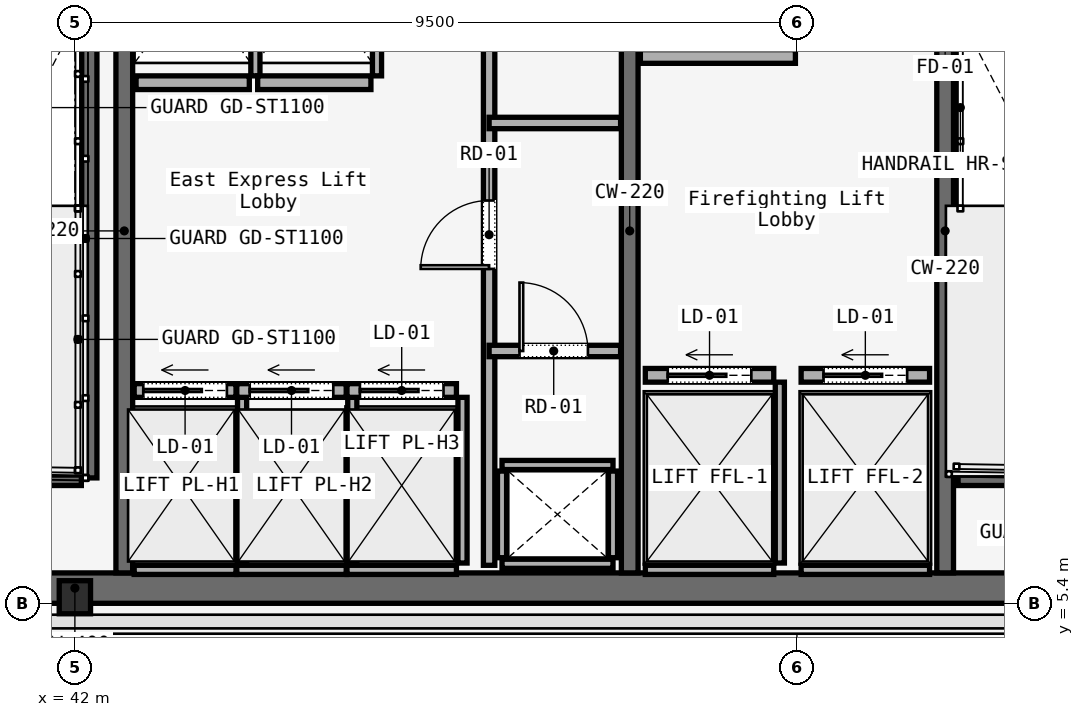
"""IFC4 building model, lengths in metres.
Left out: names, types, materials, properties, quantities, classifications, styles, units other than length and angle.
Written with IfcOpenShell. Run it as: python <this file> out.ifc"""

import sys

from ifc_helpers import new_model, si_unit, direction, frame, frame_2d, origin, origin_2d, place, context, subcontext, project, spatial, rectangle, i_section, extrude, element, fill, save


model = new_model("IFC4")
c1 = context("Model", 3, precision=1e-05, world=origin(), true_north=direction((0.0, 1.0)))
c2 = subcontext(c1, "Body", "Model", "MODEL_VIEW")
j1 = project(units=[si_unit("LENGTHUNIT", "METRE"), si_unit("PLANEANGLEUNIT", "RADIAN")], contexts=[c1])
p1 = place(None, origin())
s1 = spatial("IfcSite", under=j1, at=p1, CompositionType="ELEMENT")
p2 = place(p1, origin())
s2 = spatial("IfcBuilding", under=s1, at=p2, CompositionType="ELEMENT")
p3 = place(p2, frame((0.0, 0.0, 229.4)))
s3 = spatial("IfcBuildingStorey", under=s2, at=p3, CompositionType="ELEMENT", Elevation=229.4)
p4 = place(p3, frame((26.45, 5.6, 0.0), z_axis=(0.0, 0.0, 1.0), x_axis=(1.0, 0.0, 0.0)))
e1 = element("IfcWall", 1, at=p4, inside=s3, PredefinedType="SOLIDWALL", context=c2, shape_type="SweptSolid", body=[
    extrude(rectangle(XDim=31.1, YDim=0.4, at=frame_2d((15.55, 0.0))), origin(), (0.0, 0.0, 1.0), 3.58),
])
for number, where, z_axis, x_axis in (
    (2, (42.65, 5.8, 0.0), (0.0, 0.0, 1.0), (0.0, 1.0, 0.0)),
    (3, (49.3, 5.8, 0.0), (0.0, 0.0, 1.0), (0.0, 1.0, 0.0)),
):
    element("IfcWall", number, at=place(p3, frame(where, z_axis=z_axis, x_axis=x_axis)), inside=s3, PredefinedType="SOLIDWALL", context=c2, shape_type="SweptSolid", body=[
        extrude(rectangle(XDim=9.0, YDim=0.22, at=frame_2d((4.5, 0.0))), origin(), (0.0, 0.0, 1.0), 3.58),
    ])
p5 = place(p3, frame((53.45, 5.8, 0.0), z_axis=(0.0, 0.0, 1.0), x_axis=(0.0, 1.0, 0.0)))
e4 = element("IfcWall", 4, at=p5, inside=s3, PredefinedType="SOLIDWALL", context=c2, shape_type="SweptSolid", body=[
    extrude(rectangle(XDim=9.0, YDim=0.22, at=frame_2d((4.5, 0.0))), origin(), (0.0, 0.0, 1.0), 3.58),
])
p6 = place(p5, frame((7.5, 0.0, 0.0)))
e5 = element("IfcOpeningElement", 5, at=p6, cuts=e4, PredefinedType="OPENING", context=c2, shape_type="SweptSolid", body=[
    extrude(rectangle(XDim=1.1, YDim=2.2, at=frame_2d((0.55, 1.1))), frame((0.0, 0.11, 0.0), z_axis=(0.0, -1.0, 0.0), x_axis=(1.0, 0.0, 0.0)), (0.0, 0.0, 1.0), 0.22),
])
p7 = place(p3, frame((42.0, 5.48, 0.0), z_axis=(0.0, 0.0, 1.0), x_axis=(1.0, 0.0, 0.0)))
e6 = element("IfcColumn", 6, at=p7, inside=s3, PredefinedType="COLUMN", context=c2, shape_type="SweptSolid", body=[
    extrude(i_section(OverallWidth=0.412, OverallDepth=0.435, WebThickness=0.036, FlangeThickness=0.044, FilletRadius=0.015, at=origin_2d()), origin(), (0.0, 0.0, 1.0), 3.58),
])
p8 = place(p3, frame((42.19, 14.7, 0.0), z_axis=(0.0, 0.0, 1.0), x_axis=(0.0, -1.0, 0.0)))
e7 = element("IfcWall", 7, at=p8, inside=s3, PredefinedType="SOLIDWALL", context=c2, shape_type="SweptSolid", body=[
    extrude(rectangle(XDim=7.65, YDim=0.2, at=frame_2d((3.825, 0.0))), origin(), (0.0, 0.0, 1.0), 3.8),
])
for number, where, z_axis, x_axis in (
    (8, (38.97, 7.05, 0.0), (0.0, 0.0, 1.0), (1.0, 0.0, 0.0)),
    (9, (53.62, 7.05, 0.0), (0.0, 0.0, 1.0), (1.0, 0.0, 0.0)),
):
    element("IfcWall", number, at=place(p3, frame(where, z_axis=z_axis, x_axis=x_axis)), inside=s3, PredefinedType="SOLIDWALL", context=c2, shape_type="SweptSolid", body=[
        extrude(rectangle(XDim=3.115, YDim=0.2, at=frame_2d((1.558, 0.0))), origin(), (0.0, 0.0, 1.0), 3.8),
    ])
for number, where, z_axis, x_axis in (
    (10, (47.62, 5.92, 0.0), (0.0, 0.0, 1.0), (1.0, 0.0, 0.0)),
    (11, (47.62, 7.22, 0.0), (0.0, 0.0, 1.0), (1.0, 0.0, 0.0)),
):
    element("IfcWall", number, at=place(p3, frame(where, z_axis=z_axis, x_axis=x_axis)), inside=s3, PredefinedType="SOLIDWALL", context=c2, shape_type="SweptSolid", body=[
        extrude(rectangle(XDim=1.46, YDim=0.12, at=frame_2d((0.73, 0.0))), origin(), (0.0, 0.0, 1.0), 3.01),
    ])
for number, where, z_axis, x_axis in (
    (12, (47.62, 6.0, 0.0), (0.0, 0.0, 1.0), (0.0, 1.0, 0.0)),
    (13, (49.08, 6.0, 0.0), (0.0, 0.0, 1.0), (0.0, 1.0, 0.0)),
):
    element("IfcWall", number, at=place(p3, frame(where, z_axis=z_axis, x_axis=x_axis)), inside=s3, PredefinedType="SOLIDWALL", context=c2, shape_type="SweptSolid", body=[
        extrude(rectangle(XDim=1.14, YDim=0.12, at=frame_2d((0.57, 0.0))), origin(), (0.0, 0.0, 1.0), 3.01),
    ])
p9 = place(p3, frame((47.45, 5.9, 0.0), z_axis=(0.0, 0.0, 1.0), x_axis=(0.0, 1.0, 0.0)))
e14 = element("IfcWall", 14, at=p9, inside=s3, PredefinedType="PARTITIONING", context=c2, shape_type="SweptSolid", body=[
    extrude(rectangle(XDim=8.85, YDim=0.15, at=frame_2d((4.425, 0.0))), origin(), (0.0, 0.0, 1.0), 3.01),
])
p10 = place(p9, frame((3.9, 0.0, 0.0)))
e15 = element("IfcOpeningElement", 15, at=p10, cuts=e14, PredefinedType="OPENING", context=c2, shape_type="SweptSolid", body=[
    extrude(rectangle(XDim=0.9, YDim=2.1, at=frame_2d((0.45, 1.05))), frame((0.0, 0.075, 0.0), z_axis=(0.0, -1.0, 0.0), x_axis=(1.0, 0.0, 0.0)), (0.0, 0.0, 1.0), 0.15),
])
p11 = place(p3, frame((47.45, 8.72, 0.0), z_axis=(0.0, 0.0, 1.0), x_axis=(1.0, 0.0, 0.0)))
e16 = element("IfcWall", 16, at=p11, inside=s3, PredefinedType="PARTITIONING", context=c2, shape_type="SweptSolid", body=[
    extrude(rectangle(XDim=1.73, YDim=0.15, at=frame_2d((0.865, 0.0))), origin(), (0.0, 0.0, 1.0), 3.01),
])
p12 = place(p11, frame((0.4, 0.0, 0.0)))
e17 = element("IfcOpeningElement", 17, at=p12, cuts=e16, PredefinedType="OPENING", context=c2, shape_type="SweptSolid", body=[
    extrude(rectangle(XDim=0.9, YDim=2.1, at=frame_2d((0.45, 1.05))), frame((0.0, 0.075, 0.0), z_axis=(0.0, -1.0, 0.0), x_axis=(1.0, 0.0, 0.0)), (0.0, 0.0, 1.0), 0.15),
])
p13 = place(p3, frame((47.45, 11.72, 0.0), z_axis=(0.0, 0.0, 1.0), x_axis=(1.0, 0.0, 0.0)))
e18 = element("IfcWall", 18, at=p13, inside=s3, PredefinedType="PARTITIONING", context=c2, shape_type="SweptSolid", body=[
    extrude(rectangle(XDim=1.73, YDim=0.15, at=frame_2d((0.865, 0.0))), origin(), (0.0, 0.0, 1.0), 3.01),
])
p14 = place(p3, frame((42.78, 8.2, 0.0), z_axis=(0.0, 0.0, 1.0), x_axis=(1.0, 0.0, 0.0)))
e19 = element("IfcWall", 19, at=p14, inside=s3, PredefinedType="SOLIDWALL", context=c2, shape_type="SweptSolid", body=[
    extrude(rectangle(XDim=1.34, YDim=0.18, at=frame_2d((0.67, 0.0))), origin(), (0.0, 0.0, 1.0), 3.01),
])
p15 = place(p14, frame((0.12, 0.0, 0.0)))
e20 = element("IfcOpeningElement", 20, at=p15, cuts=e19, PredefinedType="OPENING", context=c2, shape_type="SweptSolid", body=[
    extrude(rectangle(XDim=1.1, YDim=2.2, at=frame_2d((0.55, 1.1))), frame((0.0, 0.09, 0.0), z_axis=(0.0, -1.0, 0.0), x_axis=(1.0, 0.0, 0.0)), (0.0, 0.0, 1.0), 0.18),
])
p16 = place(p3, frame((42.78, 5.84, 0.0), z_axis=(0.0, 0.0, 1.0), x_axis=(1.0, 0.0, 0.0)))
e21 = element("IfcWall", 21, at=p16, inside=s3, PredefinedType="SOLIDWALL", context=c2, shape_type="SweptSolid", body=[
    extrude(rectangle(XDim=1.34, YDim=0.12, at=frame_2d((0.67, 0.0))), origin(), (0.0, 0.0, 1.0), 3.01),
])
p17 = place(p3, frame((44.2, 5.93, 0.0), z_axis=(0.0, 0.0, 1.0), x_axis=(0.0, 1.0, 0.0)))
e22 = element("IfcWall", 22, at=p17, inside=s3, PredefinedType="SOLIDWALL", context=c2, shape_type="SweptSolid", body=[
    extrude(rectangle(XDim=2.18, YDim=0.12, at=frame_2d((1.09, 0.0))), origin(), (0.0, 0.0, 1.0), 3.01),
])
p18 = place(p3, frame((44.13, 8.2, 0.0), z_axis=(0.0, 0.0, 1.0), x_axis=(1.0, 0.0, 0.0)))
e23 = element("IfcWall", 23, at=p18, inside=s3, PredefinedType="SOLIDWALL", context=c2, shape_type="SweptSolid", body=[
    extrude(rectangle(XDim=1.44, YDim=0.18, at=frame_2d((0.72, 0.0))), origin(), (0.0, 0.0, 1.0), 3.01),
])
p19 = place(p18, frame((0.17, 0.0, 0.0)))
e24 = element("IfcOpeningElement", 24, at=p19, cuts=e23, PredefinedType="OPENING", context=c2, shape_type="SweptSolid", body=[
    extrude(rectangle(XDim=1.1, YDim=2.2, at=frame_2d((0.55, 1.1))), frame((0.0, 0.09, 0.0), z_axis=(0.0, -1.0, 0.0), x_axis=(1.0, 0.0, 0.0)), (0.0, 0.0, 1.0), 0.18),
])
p20 = place(p3, frame((44.13, 5.84, 0.0), z_axis=(0.0, 0.0, 1.0), x_axis=(1.0, 0.0, 0.0)))
e25 = element("IfcWall", 25, at=p20, inside=s3, PredefinedType="SOLIDWALL", context=c2, shape_type="SweptSolid", body=[
    extrude(rectangle(XDim=1.44, YDim=0.12, at=frame_2d((0.72, 0.0))), origin(), (0.0, 0.0, 1.0), 3.01),
])
p21 = place(p3, frame((45.65, 5.93, 0.0), z_axis=(0.0, 0.0, 1.0), x_axis=(0.0, 1.0, 0.0)))
e26 = element("IfcWall", 26, at=p21, inside=s3, PredefinedType="SOLIDWALL", context=c2, shape_type="SweptSolid", body=[
    extrude(rectangle(XDim=2.18, YDim=0.12, at=frame_2d((1.09, 0.0))), origin(), (0.0, 0.0, 1.0), 3.01),
])
p22 = place(p3, frame((45.58, 8.2, 0.0), z_axis=(0.0, 0.0, 1.0), x_axis=(1.0, 0.0, 0.0)))
e27 = element("IfcWall", 27, at=p22, inside=s3, PredefinedType="SOLIDWALL", context=c2, shape_type="SweptSolid", body=[
    extrude(rectangle(XDim=1.44, YDim=0.18, at=frame_2d((0.72, 0.0))), origin(), (0.0, 0.0, 1.0), 3.01),
])
p23 = place(p22, frame((0.17, 0.0, 0.0)))
e28 = element("IfcOpeningElement", 28, at=p23, cuts=e27, PredefinedType="OPENING", context=c2, shape_type="SweptSolid", body=[
    extrude(rectangle(XDim=1.1, YDim=2.2, at=frame_2d((0.55, 1.1))), frame((0.0, 0.09, 0.0), z_axis=(0.0, -1.0, 0.0), x_axis=(1.0, 0.0, 0.0)), (0.0, 0.0, 1.0), 0.18),
])
p24 = place(p3, frame((45.58, 5.84, 0.0), z_axis=(0.0, 0.0, 1.0), x_axis=(1.0, 0.0, 0.0)))
e29 = element("IfcWall", 29, at=p24, inside=s3, PredefinedType="SOLIDWALL", context=c2, shape_type="SweptSolid", body=[
    extrude(rectangle(XDim=1.44, YDim=0.12, at=frame_2d((0.72, 0.0))), origin(), (0.0, 0.0, 1.0), 3.01),
])
p25 = place(p3, frame((47.1, 5.93, 0.0), z_axis=(0.0, 0.0, 1.0), x_axis=(0.0, 1.0, 0.0)))
e30 = element("IfcWall", 30, at=p25, inside=s3, PredefinedType="SOLIDWALL", context=c2, shape_type="SweptSolid", body=[
    extrude(rectangle(XDim=2.18, YDim=0.12, at=frame_2d((1.09, 0.0))), origin(), (0.0, 0.0, 1.0), 3.01),
])
p26 = place(p3, frame((42.805, 12.25, 0.0), z_axis=(0.0, 0.0, 1.0), x_axis=(1.0, 0.0, 0.0)))
e31 = element("IfcWall", 31, at=p26, inside=s3, PredefinedType="SOLIDWALL", context=c2, shape_type="SweptSolid", body=[
    extrude(rectangle(XDim=1.49, YDim=0.18, at=frame_2d((0.745, 0.0))), origin(), (0.0, 0.0, 1.0), 3.01),
])
p27 = place(p3, frame((44.375, 12.34, 0.0), z_axis=(0.0, 0.0, 1.0), x_axis=(0.0, 1.0, 0.0)))
e32 = element("IfcWall", 32, at=p27, inside=s3, PredefinedType="SOLIDWALL", context=c2, shape_type="SweptSolid", body=[
    extrude(rectangle(XDim=2.23, YDim=0.12, at=frame_2d((1.115, 0.0))), origin(), (0.0, 0.0, 1.0), 3.01),
])
p28 = place(p3, frame((44.405, 12.25, 0.0), z_axis=(0.0, 0.0, 1.0), x_axis=(1.0, 0.0, 0.0)))
e33 = element("IfcWall", 33, at=p28, inside=s3, PredefinedType="SOLIDWALL", context=c2, shape_type="SweptSolid", body=[
    extrude(rectangle(XDim=1.49, YDim=0.18, at=frame_2d((0.745, 0.0))), origin(), (0.0, 0.0, 1.0), 3.01),
])
p29 = place(p3, frame((45.975, 12.34, 0.0), z_axis=(0.0, 0.0, 1.0), x_axis=(0.0, 1.0, 0.0)))
e34 = element("IfcWall", 34, at=p29, inside=s3, PredefinedType="SOLIDWALL", context=c2, shape_type="SweptSolid", body=[
    extrude(rectangle(XDim=2.23, YDim=0.12, at=frame_2d((1.115, 0.0))), origin(), (0.0, 0.0, 1.0), 3.01),
])
p30 = place(p3, frame((49.505, 8.4, 0.0), z_axis=(0.0, 0.0, 1.0), x_axis=(1.0, 0.0, 0.0)))
e35 = element("IfcWall", 35, at=p30, inside=s3, PredefinedType="SOLIDWALL", context=c2, shape_type="SweptSolid", body=[
    extrude(rectangle(XDim=1.69, YDim=0.18, at=frame_2d((0.845, 0.0))), origin(), (0.0, 0.0, 1.0), 3.01),
])
p31 = place(p30, frame((0.295, 0.0, 0.0)))
e36 = element("IfcOpeningElement", 36, at=p31, cuts=e35, PredefinedType="OPENING", context=c2, shape_type="SweptSolid", body=[
    extrude(rectangle(XDim=1.1, YDim=2.2, at=frame_2d((0.55, 1.1))), frame((0.0, 0.09, 0.0), z_axis=(0.0, -1.0, 0.0), x_axis=(1.0, 0.0, 0.0)), (0.0, 0.0, 1.0), 0.18),
])
p32 = place(p3, frame((49.505, 5.84, 0.0), z_axis=(0.0, 0.0, 1.0), x_axis=(1.0, 0.0, 0.0)))
e37 = element("IfcWall", 37, at=p32, inside=s3, PredefinedType="SOLIDWALL", context=c2, shape_type="SweptSolid", body=[
    extrude(rectangle(XDim=1.69, YDim=0.12, at=frame_2d((0.845, 0.0))), origin(), (0.0, 0.0, 1.0), 3.01),
])
p33 = place(p3, frame((51.275, 5.93, 0.0), z_axis=(0.0, 0.0, 1.0), x_axis=(0.0, 1.0, 0.0)))
e38 = element("IfcWall", 38, at=p33, inside=s3, PredefinedType="SOLIDWALL", context=c2, shape_type="SweptSolid", body=[
    extrude(rectangle(XDim=2.38, YDim=0.12, at=frame_2d((1.19, 0.0))), origin(), (0.0, 0.0, 1.0), 3.01),
])
p34 = place(p3, frame((51.555, 8.4, 0.0), z_axis=(0.0, 0.0, 1.0), x_axis=(1.0, 0.0, 0.0)))
e39 = element("IfcWall", 39, at=p34, inside=s3, PredefinedType="SOLIDWALL", context=c2, shape_type="SweptSolid", body=[
    extrude(rectangle(XDim=1.69, YDim=0.18, at=frame_2d((0.845, 0.0))), origin(), (0.0, 0.0, 1.0), 3.01),
])
p35 = place(p34, frame((0.295, 0.0, 0.0)))
e40 = element("IfcOpeningElement", 40, at=p35, cuts=e39, PredefinedType="OPENING", context=c2, shape_type="SweptSolid", body=[
    extrude(rectangle(XDim=1.1, YDim=2.2, at=frame_2d((0.55, 1.1))), frame((0.0, 0.09, 0.0), z_axis=(0.0, -1.0, 0.0), x_axis=(1.0, 0.0, 0.0)), (0.0, 0.0, 1.0), 0.18),
])
p36 = place(p3, frame((51.555, 5.84, 0.0), z_axis=(0.0, 0.0, 1.0), x_axis=(1.0, 0.0, 0.0)))
e41 = element("IfcWall", 41, at=p36, inside=s3, PredefinedType="SOLIDWALL", context=c2, shape_type="SweptSolid", body=[
    extrude(rectangle(XDim=1.69, YDim=0.12, at=frame_2d((0.845, 0.0))), origin(), (0.0, 0.0, 1.0), 3.01),
])
p37 = place(p3, frame((49.44, 12.595, 0.0), z_axis=(0.0, 0.0, 1.0), x_axis=(1.0, 0.0, 0.0)))
e42 = element("IfcWall", 42, at=p37, inside=s3, PredefinedType="SOLIDWALL", context=c2, shape_type="SweptSolid", body=[
    extrude(rectangle(XDim=2.04, YDim=0.18, at=frame_2d((1.02, 0.0))), origin(), (0.0, 0.0, 1.0), 3.01),
])
p38 = place(p10, origin())
e43 = element("IfcDoor", 43, at=p38, inside=s3, OperationType="SINGLE_SWING_LEFT", PredefinedType="DOOR", context=c2, shape_type="SweptSolid", body=[
    extrude(rectangle(XDim=0.9, YDim=2.1, at=frame_2d((0.45, 1.05))), frame((0.0, 0.025, 0.0), z_axis=(0.0, -1.0, 0.0), x_axis=(1.0, 0.0, 0.0)), (0.0, 0.0, 1.0), 0.05),
])
fill(e15, e43)
p39 = place(p12, origin())
e44 = element("IfcDoor", 44, at=p39, inside=s3, OperationType="SINGLE_SWING_RIGHT", PredefinedType="DOOR", context=c2, shape_type="SweptSolid", body=[
    extrude(rectangle(XDim=0.9, YDim=2.1, at=frame_2d((0.45, 1.05))), frame((0.0, 0.025, 0.0), z_axis=(0.0, -1.0, 0.0), x_axis=(1.0, 0.0, 0.0)), (0.0, 0.0, 1.0), 0.05),
])
fill(e17, e44)
p40 = place(p15, origin())
e45 = element("IfcDoor", 45, at=p40, inside=s3, OperationType="SLIDING_TO_LEFT", PredefinedType="DOOR", context=c2, shape_type="SweptSolid", body=[
    extrude(rectangle(XDim=1.1, YDim=2.2, at=frame_2d((0.55, 1.1))), frame((0.0, 0.025, 0.0), z_axis=(0.0, -1.0, 0.0), x_axis=(1.0, 0.0, 0.0)), (0.0, 0.0, 1.0), 0.05),
])
fill(e20, e45)
p41 = place(p19, origin())
e46 = element("IfcDoor", 46, at=p41, inside=s3, OperationType="SLIDING_TO_LEFT", PredefinedType="DOOR", context=c2, shape_type="SweptSolid", body=[
    extrude(rectangle(XDim=1.1, YDim=2.2, at=frame_2d((0.55, 1.1))), frame((0.0, 0.025, 0.0), z_axis=(0.0, -1.0, 0.0), x_axis=(1.0, 0.0, 0.0)), (0.0, 0.0, 1.0), 0.05),
])
fill(e24, e46)
p42 = place(p23, origin())
e47 = element("IfcDoor", 47, at=p42, inside=s3, OperationType="SLIDING_TO_LEFT", PredefinedType="DOOR", context=c2, shape_type="SweptSolid", body=[
    extrude(rectangle(XDim=1.1, YDim=2.2, at=frame_2d((0.55, 1.1))), frame((0.0, 0.025, 0.0), z_axis=(0.0, -1.0, 0.0), x_axis=(1.0, 0.0, 0.0)), (0.0, 0.0, 1.0), 0.05),
])
fill(e28, e47)
p43 = place(p31, origin())
e48 = element("IfcDoor", 48, at=p43, inside=s3, OperationType="SLIDING_TO_LEFT", PredefinedType="DOOR", context=c2, shape_type="SweptSolid", body=[
    extrude(rectangle(XDim=1.1, YDim=2.2, at=frame_2d((0.55, 1.1))), frame((0.0, 0.025, 0.0), z_axis=(0.0, -1.0, 0.0), x_axis=(1.0, 0.0, 0.0)), (0.0, 0.0, 1.0), 0.05),
])
fill(e36, e48)
p44 = place(p35, origin())
e49 = element("IfcDoor", 49, at=p44, inside=s3, OperationType="SLIDING_TO_LEFT", PredefinedType="DOOR", context=c2, shape_type="SweptSolid", body=[
    extrude(rectangle(XDim=1.1, YDim=2.2, at=frame_2d((0.55, 1.1))), frame((0.0, 0.025, 0.0), z_axis=(0.0, -1.0, 0.0), x_axis=(1.0, 0.0, 0.0)), (0.0, 0.0, 1.0), 0.05),
])
fill(e40, e49)
save(model, sys.argv[1])
